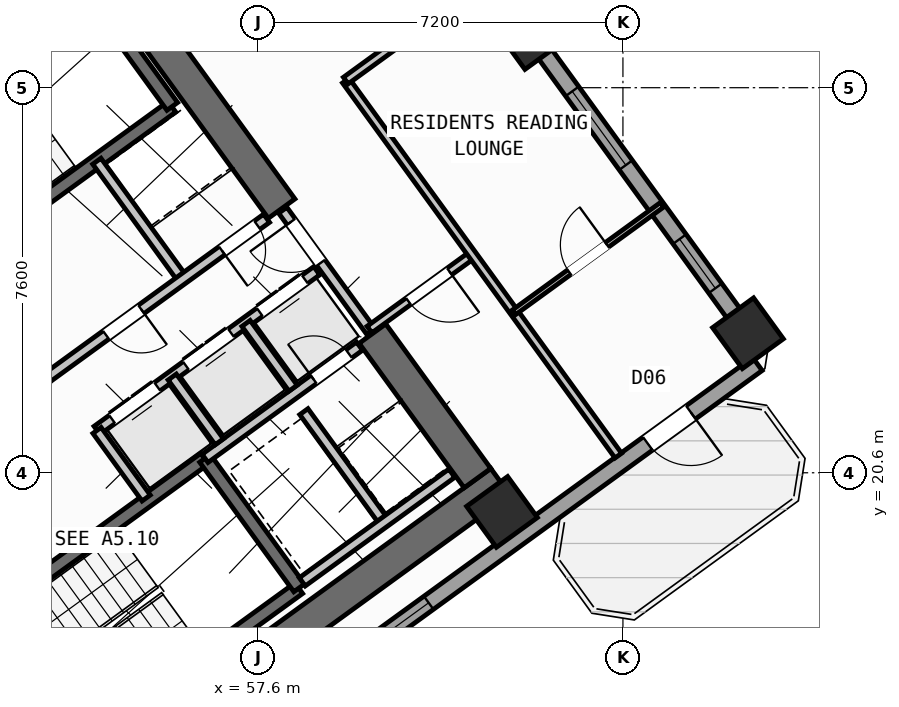
"""IFC4 building model, lengths in metres.
Left out: names, types, materials, properties, quantities, classifications, styles, units other than length and angle.
Written with IfcOpenShell. Run it as: python <this file> out.ifc"""

import sys

from ifc_helpers import new_model, si_unit, direction, frame, frame_2d, origin, origin_2d, place, context, subcontext, project, spatial, rectangle, hollow_rectangle, extrude, source, transform, mapped, element, fill, save


model = new_model("IFC4")
c1 = context("Model", 3, precision=1e-05, world=origin(), true_north=direction((0.0, 1.0)))
c2 = subcontext(c1, "Body", "Model", "MODEL_VIEW")
j1 = project(units=[si_unit("LENGTHUNIT", "METRE"), si_unit("PLANEANGLEUNIT", "RADIAN")], contexts=[c1])
p1 = place(None, origin())
s1 = spatial("IfcSite", under=j1, at=p1, CompositionType="ELEMENT")
p2 = place(p1, origin())
s2 = spatial("IfcBuilding", under=s1, at=p2, CompositionType="ELEMENT")
p3 = place(p2, frame((0.0, 0.0, 71.7)))
s3 = spatial("IfcBuildingStorey", under=s2, at=p3, CompositionType="ELEMENT", Elevation=71.7)
p4 = place(p3, frame((52.318, 13.11, 0.0), z_axis=(0.0, 0.0, 1.0), x_axis=(0.809019445368, 0.587781878776, 0.0)))
e1 = element("IfcWall", 1, at=p4, inside=s3, PredefinedType="SHEAR", context=c2, shape_type="SweptSolid", body=[
    extrude(rectangle(XDim=12.44, YDim=0.65, at=frame_2d((6.22, 0.0))), origin(), (0.0, 0.0, 1.0), 4.52),
])
p5 = place(p3, frame((44.325, 24.113, 0.0), z_axis=(0.0, 0.0, 1.0), x_axis=(0.809012664862, 0.58779121131, 0.0)))
e2 = element("IfcWall", 2, at=p5, inside=s3, PredefinedType="SHEAR", context=c2, shape_type="SweptSolid", body=[
    extrude(rectangle(XDim=12.44, YDim=0.65, at=frame_2d((6.22, 0.0))), origin(), (0.0, 0.0, 1.0), 4.52),
])
p6 = place(p3, frame((61.929, 20.494, 0.0), z_axis=(0.0, 0.0, 1.0), x_axis=(-0.58782982593, 0.808984607855, 0.0)))
e3 = element("IfcWall", 3, at=p6, inside=s3, PredefinedType="SHEAR", context=c2, shape_type="SweptSolid", body=[
    extrude(rectangle(XDim=3.525, YDim=0.65, at=frame_2d((1.762, 0.0))), origin(), (0.0, 0.0, 1.0), 4.52),
])
p7 = place(p3, frame((58.064, 25.813, 0.0), z_axis=(0.0, 0.0, 1.0), x_axis=(-0.58777996584, 0.809020835181, 0.0)))
e4 = element("IfcWall", 4, at=p7, inside=s3, PredefinedType="SHEAR", context=c2, shape_type="SweptSolid", body=[
    extrude(rectangle(XDim=6.375, YDim=0.65, at=frame_2d((3.188, 0.0))), origin(), (0.0, 0.0, 1.0), 4.52),
])
m1 = source(origin(), c2, "Body", "SweptSolid", [
    extrude(hollow_rectangle(XDim=1.0, YDim=1.0, WallThickness=0.04, at=origin_2d()), origin(), (0.0, 0.0, 1.0), 4.8),
])
for number, where, z_axis, x_axis in (
    (5, (62.414, 19.827, 0.0), (0.0, 0.0, 1.0), (0.809, 0.588, 0.0)),
    (6, (67.268, 23.354, 0.0), (0.0, 0.0, 1.0), (0.809, 0.588, 0.0)),
    (7, (62.977, 29.259, 0.0), (0.0, 0.0, 1.0), (0.809, 0.588, 0.0)),
):
    element("IfcColumn", number, at=place(p3, frame(where, z_axis=z_axis, x_axis=x_axis)), inside=s3, PredefinedType="COLUMN", context=c2, shape_type="MappedRepresentation", body=[
        mapped(m1, transform((0.0, 0.0, 0.0), scale=1.0)),
    ])
p8 = place(p3, frame((54.81, 40.5, 0.0), z_axis=(0.0, 0.0, 1.0), x_axis=(0.587783625747, -0.809018176127, 0.0)))
e8 = element("IfcWall", 8, at=p8, inside=s3, PredefinedType="STANDARD", context=c2, shape_type="SweptSolid", body=[
    extrude(rectangle(XDim=21.587, YDim=0.32, at=frame_2d((10.794, 0.0))), origin(), (0.0, 0.0, 1.0), 3.895),
])
p9 = place(p8, frame((7.729, 0.0, 0.85)))
e9 = element("IfcOpeningElement", 9, at=p9, cuts=e8, PredefinedType="OPENING", context=c2, shape_type="SweptSolid", body=[
    extrude(rectangle(XDim=1.8, YDim=1.5, at=frame_2d((0.9, 0.75))), frame((0.0, 0.17, 0.0), z_axis=(0.0, -1.0, 0.0), x_axis=(1.0, 0.0, 0.0)), (0.0, 0.0, 1.0), 0.34),
])
p10 = place(p8, frame((15.292, 0.0, 0.85)))
e10 = element("IfcOpeningElement", 10, at=p10, cuts=e8, PredefinedType="OPENING", context=c2, shape_type="SweptSolid", body=[
    extrude(rectangle(XDim=1.8, YDim=1.5, at=frame_2d((0.9, 0.75))), frame((0.0, 0.17, 0.0), z_axis=(0.0, -1.0, 0.0), x_axis=(1.0, 0.0, 0.0)), (0.0, 0.0, 1.0), 0.34),
])
p11 = place(p8, frame((18.897, 0.0, 0.95)))
e11 = element("IfcOpeningElement", 11, at=p11, cuts=e8, PredefinedType="OPENING", context=c2, shape_type="SweptSolid", body=[
    extrude(rectangle(XDim=1.2, YDim=1.4, at=frame_2d((0.6, 0.7))), frame((0.0, 0.17, 0.0), z_axis=(0.0, -1.0, 0.0), x_axis=(1.0, 0.0, 0.0)), (0.0, 0.0, 1.0), 0.34),
])
p12 = place(p3, frame((67.454, 22.747, 0.0), z_axis=(0.0, 0.0, 1.0), x_axis=(-0.809021120468, -0.587779573171, 0.0)))
e12 = element("IfcWall", 12, at=p12, inside=s3, PredefinedType="STANDARD", context=c2, shape_type="SweptSolid", body=[
    extrude(rectangle(XDim=17.588, YDim=0.32, at=frame_2d((8.794, 0.0))), origin(), (0.0, 0.0, 1.0), 4.52),
])
p13 = place(p12, frame((1.624, 0.0, 0.0)))
e13 = element("IfcOpeningElement", 13, at=p13, cuts=e12, PredefinedType="OPENING", context=c2, shape_type="SweptSolid", body=[
    extrude(rectangle(XDim=1.05, YDim=2.15, at=frame_2d((0.525, 1.075))), frame((0.0, 0.17, 0.0), z_axis=(0.0, -1.0, 0.0), x_axis=(1.0, 0.0, 0.0)), (0.0, 0.0, 1.0), 0.34),
])
p14 = place(p12, frame((8.019, 0.0, 0.75)))
e14 = element("IfcOpeningElement", 14, at=p14, cuts=e12, PredefinedType="OPENING", context=c2, shape_type="SweptSolid", body=[
    extrude(rectangle(XDim=2.4, YDim=1.6, at=frame_2d((1.2, 0.8))), frame((0.0, 0.17, 0.0), z_axis=(0.0, -1.0, 0.0), x_axis=(1.0, 0.0, 0.0)), (0.0, 0.0, 1.0), 0.34),
])
p15 = place(p12, frame((13.169, 0.0, 0.75)))
e15 = element("IfcOpeningElement", 15, at=p15, cuts=e12, PredefinedType="OPENING", context=c2, shape_type="SweptSolid", body=[
    extrude(rectangle(XDim=2.4, YDim=1.6, at=frame_2d((1.2, 0.8))), frame((0.0, 0.17, 0.0), z_axis=(0.0, -1.0, 0.0), x_axis=(1.0, 0.0, 0.0)), (0.0, 0.0, 1.0), 0.34),
])
p16 = place(p3, frame((48.006, 25.996, 0.0), z_axis=(0.0, 0.0, 1.0), x_axis=(0.80901903764, 0.587782439969, 0.0)))
e16 = element("IfcWall", 16, at=p16, inside=s3, PredefinedType="SHEAR", context=c2, shape_type="SweptSolid", body=[
    extrude(rectangle(XDim=7.46, YDim=0.26, at=frame_2d((3.73, 0.0))), origin(), (0.0, 0.0, 1.0), 4.52),
])
p17 = place(p3, frame((49.863, 23.44, 0.0), z_axis=(0.0, 0.0, 1.0), x_axis=(0.809003474932, 0.587803859759, 0.0)))
e17 = element("IfcWall", 17, at=p17, inside=s3, PredefinedType="SHEAR", context=c2, shape_type="SweptSolid", body=[
    extrude(rectangle(XDim=7.46, YDim=0.26, at=frame_2d((3.73, 0.0))), origin(), (0.0, 0.0, 1.0), 4.52),
])
p18 = place(p17, frame((0.36, 0.0, 0.0)))
e18 = element("IfcOpeningElement", 18, at=p18, cuts=e17, PredefinedType="OPENING", context=c2, shape_type="SweptSolid", body=[
    extrude(rectangle(XDim=0.86, YDim=2.05, at=frame_2d((0.43, 1.025))), frame((0.0, 0.14, 0.0), z_axis=(0.0, -1.0, 0.0), x_axis=(1.0, 0.0, 0.0)), (0.0, 0.0, 1.0), 0.28),
])
p19 = place(p3, frame((55.906, 27.831, 0.0), z_axis=(0.0, 0.0, 1.0), x_axis=(-0.587804123638, 0.809003283204, 0.0)))
e19 = element("IfcWall", 19, at=p19, inside=s3, PredefinedType="SHEAR", context=c2, shape_type="SweptSolid", body=[
    extrude(rectangle(XDim=3.16, YDim=0.26, at=frame_2d((1.58, 0.0))), origin(), (0.0, 0.0, 1.0), 4.52),
])
p20 = place(p3, frame((52.472, 14.013, 0.0), z_axis=(0.0, 0.0, 1.0), x_axis=(0.809028366311, 0.587769599847, 0.0)))
e20 = element("IfcWall", 20, at=p20, inside=s3, PredefinedType="SHEAR", context=c2, shape_type="SweptSolid", body=[
    extrude(rectangle(XDim=7.33, YDim=0.26, at=frame_2d((3.665, 0.0))), origin(), (0.0, 0.0, 1.0), 4.52),
])
p21 = place(p3, frame((50.615, 16.57, 0.0), z_axis=(0.0, 0.0, 1.0), x_axis=(0.809028366311, 0.587769599847, 0.0)))
e21 = element("IfcWall", 21, at=p21, inside=s3, PredefinedType="SHEAR", context=c2, shape_type="SweptSolid", body=[
    extrude(rectangle(XDim=7.33, YDim=0.26, at=frame_2d((3.665, 0.0))), origin(), (0.0, 0.0, 1.0), 4.52),
])
p22 = place(p21, frame((0.22, 0.0, 0.0)))
e22 = element("IfcOpeningElement", 22, at=p22, cuts=e21, PredefinedType="OPENING", context=c2, shape_type="SweptSolid", body=[
    extrude(rectangle(XDim=1.1, YDim=2.1, at=frame_2d((0.55, 1.05))), frame((0.0, 0.14, 0.0), z_axis=(0.0, -1.0, 0.0), x_axis=(1.0, 0.0, 0.0)), (0.0, 0.0, 1.0), 0.28),
])
p23 = place(p3, frame((58.41, 18.327, 0.0), z_axis=(0.0, 0.0, 1.0), x_axis=(-0.58776738483, 0.809029975545, 0.0)))
e23 = element("IfcWall", 23, at=p23, inside=s3, PredefinedType="SHEAR", context=c2, shape_type="SweptSolid", body=[
    extrude(rectangle(XDim=3.16, YDim=0.26, at=frame_2d((1.58, 0.0))), origin(), (0.0, 0.0, 1.0), 4.52),
])
p24 = place(p3, frame((56.553, 20.884, 0.0), z_axis=(0.0, 0.0, 1.0), x_axis=(0.809035789462, 0.587759382205, 0.0)))
e24 = element("IfcWall", 24, at=p24, inside=s3, PredefinedType="STANDARD", context=c2, shape_type="SweptSolid", body=[
    extrude(rectangle(XDim=3.768, YDim=0.2, at=frame_2d((1.884, 0.0))), origin(), (0.0, 0.0, 1.0), 4.51),
])
p25 = place(p24, frame((2.65, 0.0, 0.0)))
e25 = element("IfcOpeningElement", 25, at=p25, cuts=e24, PredefinedType="OPENING", context=c2, shape_type="SweptSolid", body=[
    extrude(rectangle(XDim=0.86, YDim=2.05, at=frame_2d((0.43, 1.025))), frame((0.0, 0.11, 0.0), z_axis=(0.0, -1.0, 0.0), x_axis=(1.0, 0.0, 0.0)), (0.0, 0.0, 1.0), 0.22),
])
p26 = place(p3, frame((54.421, 21.436, 0.0), z_axis=(0.0, 0.0, 1.0), x_axis=(0.809013710463, 0.587789772183, 0.0)))
e26 = element("IfcWall", 26, at=p26, inside=s3, PredefinedType="STANDARD", context=c2, shape_type="SweptSolid", body=[
    extrude(rectangle(XDim=5.36, YDim=0.2, at=frame_2d((2.68, 0.0))), origin(), (0.0, 0.0, 1.0), 4.51),
])
p27 = place(p26, frame((0.37, 0.0, 0.0)))
e27 = element("IfcOpeningElement", 27, at=p27, cuts=e26, PredefinedType="OPENING", context=c2, shape_type="SweptSolid", body=[
    extrude(rectangle(XDim=1.1, YDim=2.15, at=frame_2d((0.55, 1.075))), frame((0.0, 0.11, 0.0), z_axis=(0.0, -1.0, 0.0), x_axis=(1.0, 0.0, 0.0)), (0.0, 0.0, 1.0), 0.22),
])
p28 = place(p26, frame((2.17, 0.0, 0.0)))
e28 = element("IfcOpeningElement", 28, at=p28, cuts=e26, PredefinedType="OPENING", context=c2, shape_type="SweptSolid", body=[
    extrude(rectangle(XDim=1.1, YDim=2.15, at=frame_2d((0.55, 1.075))), frame((0.0, 0.11, 0.0), z_axis=(0.0, -1.0, 0.0), x_axis=(1.0, 0.0, 0.0)), (0.0, 0.0, 1.0), 0.22),
])
p29 = place(p26, frame((3.97, 0.0, 0.0)))
e29 = element("IfcOpeningElement", 29, at=p29, cuts=e26, PredefinedType="OPENING", context=c2, shape_type="SweptSolid", body=[
    extrude(rectangle(XDim=1.1, YDim=2.15, at=frame_2d((0.55, 1.075))), frame((0.0, 0.11, 0.0), z_axis=(0.0, -1.0, 0.0), x_axis=(1.0, 0.0, 0.0)), (0.0, 0.0, 1.0), 0.22),
])
p30 = place(p3, frame((55.391, 20.102, 0.0), z_axis=(0.0, 0.0, 1.0), x_axis=(-0.58778447739, 0.809017557374, 0.0)))
e30 = element("IfcWall", 30, at=p30, inside=s3, PredefinedType="STANDARD", context=c2, shape_type="SweptSolid", body=[
    extrude(rectangle(XDim=1.65, YDim=0.2, at=frame_2d((0.825, 0.0))), origin(), (0.0, 0.0, 1.0), 4.51),
])
p31 = place(p3, frame((56.834, 21.212, 0.0), z_axis=(0.0, 0.0, 1.0), x_axis=(-0.58776738483, 0.809029975545, 0.0)))
e31 = element("IfcWall", 31, at=p31, inside=s3, PredefinedType="STANDARD", context=c2, shape_type="SweptSolid", body=[
    extrude(rectangle(XDim=1.58, YDim=0.2, at=frame_2d((0.79, 0.0))), origin(), (0.0, 0.0, 1.0), 4.51),
])
p32 = place(p3, frame((58.29, 22.27, 0.0), z_axis=(0.0, 0.0, 1.0), x_axis=(-0.587840865826, 0.808976585857, 0.0)))
e32 = element("IfcWall", 32, at=p32, inside=s3, PredefinedType="STANDARD", context=c2, shape_type="SweptSolid", body=[
    extrude(rectangle(XDim=1.58, YDim=0.2, at=frame_2d((0.79, 0.0))), origin(), (0.0, 0.0, 1.0), 4.51),
])
p33 = place(p3, frame((60.067, 19.655, 0.0), z_axis=(0.0, 0.0, 1.0), x_axis=(-0.587800520745, 0.809005900975, 0.0)))
e33 = element("IfcWall", 33, at=p33, inside=s3, PredefinedType="STANDARD", context=c2, shape_type="SweptSolid", body=[
    extrude(rectangle(XDim=2.66, YDim=0.2, at=frame_2d((1.33, 0.0))), origin(), (0.0, 0.0, 1.0), 4.51),
])
p34 = place(p3, frame((58.472, 18.447, 0.0), z_axis=(0.0, 0.0, 1.0), x_axis=(0.809022487728, 0.587777691266, 0.0)))
e34 = element("IfcWall", 34, at=p34, inside=s3, PredefinedType="STANDARD", context=c2, shape_type="SweptSolid", body=[
    extrude(rectangle(XDim=3.648, YDim=0.2, at=frame_2d((1.824, 0.0))), origin(), (0.0, 0.0, 1.0), 4.51),
])
p35 = place(p3, frame((56.111, 24.419, 0.0), z_axis=(0.0, 0.0, 1.0), x_axis=(-0.58777848983, 0.809021907548, 0.0)))
e35 = element("IfcWall", 35, at=p35, inside=s3, PredefinedType="STANDARD", context=c2, shape_type="SweptSolid", body=[
    extrude(rectangle(XDim=2.88, YDim=0.2, at=frame_2d((1.44, 0.0))), origin(), (0.0, 0.0, 1.0), 4.51),
])
p36 = place(p3, frame((53.425, 22.468, 0.0), z_axis=(0.0, 0.0, 1.0), x_axis=(0.80902705128, 0.587771409902, 0.0)))
e36 = element("IfcWall", 36, at=p36, inside=s3, PredefinedType="STANDARD", context=c2, shape_type="SweptSolid", body=[
    extrude(rectangle(XDim=5.368, YDim=0.2, at=frame_2d((2.684, 0.0))), origin(), (0.0, 0.0, 1.0), 4.51),
])
p37 = place(p36, frame((4.28, 0.0, 0.0)))
e37 = element("IfcOpeningElement", 37, at=p37, cuts=e36, PredefinedType="OPENING", context=c2, shape_type="SweptSolid", body=[
    extrude(rectangle(XDim=0.86, YDim=2.05, at=frame_2d((0.43, 1.025))), frame((0.0, 0.11, 0.0), z_axis=(0.0, -1.0, 0.0), x_axis=(1.0, 0.0, 0.0)), (0.0, 0.0, 1.0), 0.22),
])
p38 = place(p36, frame((1.45, 0.0, 0.0)))
e38 = element("IfcOpeningElement", 38, at=p38, cuts=e36, PredefinedType="OPENING", context=c2, shape_type="SweptSolid", body=[
    extrude(rectangle(XDim=0.86, YDim=2.05, at=frame_2d((0.43, 1.025))), frame((0.0, 0.11, 0.0), z_axis=(0.0, -1.0, 0.0), x_axis=(1.0, 0.0, 0.0)), (0.0, 0.0, 1.0), 0.22),
])
p39 = place(p3, frame((59.827, 23.386, 0.0), z_axis=(0.0, 0.0, 1.0), x_axis=(-0.587803840107, 0.809003489211, 0.0)))
e39 = element("IfcWall", 39, at=p39, inside=s3, PredefinedType="STANDARD", context=c2, shape_type="SweptSolid", body=[
    extrude(rectangle(XDim=2.96, YDim=0.2, at=frame_2d((1.48, 0.0))), origin(), (0.0, 0.0, 1.0), 4.51),
])
p40 = place(p39, frame((1.68, 0.0, 0.0)))
e40 = element("IfcOpeningElement", 40, at=p40, cuts=e39, PredefinedType="OPENING", context=c2, shape_type="SweptSolid", body=[
    extrude(rectangle(XDim=1.0, YDim=2.1, at=frame_2d((0.5, 1.05))), frame((0.0, 0.11, 0.0), z_axis=(0.0, -1.0, 0.0), x_axis=(1.0, 0.0, 0.0)), (0.0, 0.0, 1.0), 0.22),
])
p41 = place(p3, frame((59.798, 23.427, 0.0), z_axis=(0.0, 0.0, 1.0), x_axis=(0.809034604122, 0.587761013791, 0.0)))
e41 = element("IfcWall", 41, at=p41, inside=s3, PredefinedType="PARTITIONING", context=c2, shape_type="SweptSolid", body=[
    extrude(rectangle(XDim=2.51, YDim=0.16, at=frame_2d((1.255, 0.0))), origin(), (0.0, 0.0, 1.0), 4.51),
])
p42 = place(p41, frame((0.95, 0.0, 0.0)))
e42 = element("IfcOpeningElement", 42, at=p42, cuts=e41, PredefinedType="OPENING", context=c2, shape_type="SweptSolid", body=[
    extrude(rectangle(XDim=1.0, YDim=2.1, at=frame_2d((0.5, 1.05))), frame((0.0, 0.09, 0.0), z_axis=(0.0, -1.0, 0.0), x_axis=(1.0, 0.0, 0.0)), (0.0, 0.0, 1.0), 0.18),
])
p43 = place(p3, frame((64.709, 20.938, 0.0), z_axis=(0.0, 0.0, 1.0), x_axis=(-0.587776590479, 0.80902328748, 0.0)))
e43 = element("IfcWall", 43, at=p43, inside=s3, PredefinedType="PARTITIONING", context=c2, shape_type="SweptSolid", body=[
    extrude(rectangle(XDim=9.15, YDim=0.16, at=frame_2d((4.575, 0.0))), origin(), (0.0, 0.0, 1.0), 4.51),
])
p44 = place(p3, frame((59.331, 28.341, 0.0), z_axis=(0.0, 0.0, 1.0), x_axis=(0.809003564202, 0.587803736896, 0.0)))
e44 = element("IfcWall", 44, at=p44, inside=s3, PredefinedType="PARTITIONING", context=c2, shape_type="SweptSolid", body=[
    extrude(rectangle(XDim=3.63, YDim=0.16, at=frame_2d((1.815, 0.0))), origin(), (0.0, 0.0, 1.0), 4.51),
])
p45 = place(p44, frame((1.305, 0.0, 0.0)))
e45 = element("IfcOpeningElement", 45, at=p45, cuts=e44, PredefinedType="OPENING", context=c2, shape_type="SweptSolid", body=[
    extrude(rectangle(XDim=1.0, YDim=2.1, at=frame_2d((0.5, 1.05))), frame((0.0, 0.09, 0.0), z_axis=(0.0, -1.0, 0.0), x_axis=(1.0, 0.0, 0.0)), (0.0, 0.0, 1.0), 0.18),
])
p46 = place(p3, frame((62.653, 23.768, 0.0), z_axis=(0.0, 0.0, 1.0), x_axis=(0.809037198293, 0.58775744298, 0.0)))
e46 = element("IfcWall", 46, at=p46, inside=s3, PredefinedType="PARTITIONING", context=c2, shape_type="SweptSolid", body=[
    extrude(rectangle(XDim=3.61, YDim=0.11, at=frame_2d((1.805, 0.0))), origin(), (0.0, 0.0, 1.0), 4.51),
])
p47 = place(p46, frame((1.345, 0.0, 0.0)))
e47 = element("IfcOpeningElement", 47, at=p47, cuts=e46, PredefinedType="OPENING", context=c2, shape_type="SweptSolid", body=[
    extrude(rectangle(XDim=0.92, YDim=2.08, at=frame_2d((0.46, 1.04))), frame((0.0, 0.065, 0.0), z_axis=(0.0, -1.0, 0.0), x_axis=(1.0, 0.0, 0.0)), (0.0, 0.0, 1.0), 0.13),
])
p48 = place(p3, frame((42.866, 26.044, 0.0), z_axis=(0.0, 0.0, 1.0), x_axis=(0.809020254154, 0.587780765566, 0.0)))
e48 = element("IfcWall", 48, at=p48, inside=s3, PredefinedType="PARTITIONING", context=c2, shape_type="SweptSolid", body=[
    extrude(rectangle(XDim=14.67, YDim=0.16, at=frame_2d((7.335, 0.0))), origin(), (0.0, 0.0, 1.0), 4.51),
])
p49 = place(p48, frame((3.335, 0.0, 0.0)))
e49 = element("IfcOpeningElement", 49, at=p49, cuts=e48, PredefinedType="OPENING", context=c2, shape_type="SweptSolid", body=[
    extrude(rectangle(XDim=1.0, YDim=2.1, at=frame_2d((0.5, 1.05))), frame((0.0, 0.09, 0.0), z_axis=(0.0, -1.0, 0.0), x_axis=(1.0, 0.0, 0.0)), (0.0, 0.0, 1.0), 0.18),
])
p50 = place(p48, frame((9.915, 0.0, 0.0)))
e50 = element("IfcOpeningElement", 50, at=p50, cuts=e48, PredefinedType="OPENING", context=c2, shape_type="SweptSolid", body=[
    extrude(rectangle(XDim=1.0, YDim=2.1, at=frame_2d((0.5, 1.05))), frame((0.0, 0.09, 0.0), z_axis=(0.0, -1.0, 0.0), x_axis=(1.0, 0.0, 0.0)), (0.0, 0.0, 1.0), 0.18),
])
m2 = source(origin(), c2, "Body", "SweptSolid", [
    extrude(rectangle(XDim=1.05, YDim=2.15, at=frame_2d((0.525, 1.075))), frame((0.0, 0.025, 0.0), z_axis=(0.0, -1.0, 0.0), x_axis=(1.0, 0.0, 0.0)), (0.0, 0.0, 1.0), 0.05),
])
p51 = place(p13, origin())
e51 = element("IfcDoor", 51, at=p51, inside=s3, OperationType="SINGLE_SWING_LEFT", PredefinedType="DOOR", context=c2, shape_type="MappedRepresentation", body=[
    mapped(m2, transform((0.0, 0.0, 0.0), scale=1.0)),
])
fill(e13, e51)
m3 = source(origin(), c2, "Body", "SweptSolid", [
    extrude(rectangle(XDim=1.8, YDim=1.5, at=frame_2d((0.9, 0.75))), frame((0.0, 0.03, 0.0), z_axis=(0.0, -1.0, 0.0), x_axis=(1.0, 0.0, 0.0)), (0.0, 0.0, 1.0), 0.06),
])
p52 = place(p10, origin())
e52 = element("IfcWindow", 52, at=p52, inside=s3, PartitioningType="SINGLE_PANEL", PredefinedType="WINDOW", context=c2, shape_type="MappedRepresentation", body=[
    mapped(m3, transform((0.0, 0.0, 0.0), scale=1.0)),
])
fill(e10, e52)
m4 = source(origin(), c2, "Body", "SweptSolid", [
    extrude(rectangle(XDim=1.2, YDim=1.4, at=frame_2d((0.6, 0.7))), frame((0.0, 0.03, 0.0), z_axis=(0.0, -1.0, 0.0), x_axis=(1.0, 0.0, 0.0)), (0.0, 0.0, 1.0), 0.06),
])
p53 = place(p11, origin())
e53 = element("IfcWindow", 53, at=p53, inside=s3, PartitioningType="SINGLE_PANEL", PredefinedType="WINDOW", context=c2, shape_type="MappedRepresentation", body=[
    mapped(m4, transform((0.0, 0.0, 0.0), scale=1.0)),
])
fill(e11, e53)
m5 = source(origin(), c2, "Body", "SweptSolid", [
    extrude(rectangle(XDim=2.4, YDim=1.6, at=frame_2d((1.2, 0.8))), frame((0.0, 0.03, 0.0), z_axis=(0.0, -1.0, 0.0), x_axis=(1.0, 0.0, 0.0)), (0.0, 0.0, 1.0), 0.06),
])
p54 = place(p14, origin())
e54 = element("IfcWindow", 54, at=p54, inside=s3, PartitioningType="SINGLE_PANEL", PredefinedType="WINDOW", context=c2, shape_type="MappedRepresentation", body=[
    mapped(m5, transform((0.0, 0.0, 0.0), scale=1.0)),
])
fill(e14, e54)
m6 = source(origin(), c2, "Body", "SweptSolid", [
    extrude(rectangle(XDim=1.1, YDim=2.15, at=frame_2d((0.55, 1.075))), frame((0.0, 0.025, 0.0), z_axis=(0.0, -1.0, 0.0), x_axis=(1.0, 0.0, 0.0)), (0.0, 0.0, 1.0), 0.05),
])
p55 = place(p27, origin())
e55 = element("IfcDoor", 55, at=p55, inside=s3, OperationType="DOUBLE_DOOR_SLIDING", PredefinedType="DOOR", context=c2, shape_type="MappedRepresentation", body=[
    mapped(m6, transform((0.0, 0.0, 0.0), scale=1.0)),
])
fill(e27, e55)
p56 = place(p28, origin())
e56 = element("IfcDoor", 56, at=p56, inside=s3, OperationType="DOUBLE_DOOR_SLIDING", PredefinedType="DOOR", context=c2, shape_type="MappedRepresentation", body=[
    mapped(m6, transform((0.0, 0.0, 0.0), scale=1.0)),
])
fill(e28, e56)
p57 = place(p29, origin())
e57 = element("IfcDoor", 57, at=p57, inside=s3, OperationType="DOUBLE_DOOR_SLIDING", PredefinedType="DOOR", context=c2, shape_type="MappedRepresentation", body=[
    mapped(m6, transform((0.0, 0.0, 0.0), scale=1.0)),
])
fill(e29, e57)
m7 = source(origin(), c2, "Body", "SweptSolid", [
    extrude(rectangle(XDim=0.86, YDim=2.05, at=frame_2d((0.43, 1.025))), frame((0.0, 0.025, 0.0), z_axis=(0.0, -1.0, 0.0), x_axis=(1.0, 0.0, 0.0)), (0.0, 0.0, 1.0), 0.05),
])
p58 = place(p25, origin())
e58 = element("IfcDoor", 58, at=p58, inside=s3, OperationType="SINGLE_SWING_LEFT", PredefinedType="DOOR", context=c2, shape_type="MappedRepresentation", body=[
    mapped(m7, transform((0.0, 0.0, 0.0), scale=1.0)),
])
fill(e25, e58)
p59 = place(p37, frame((0.86, 0.0, 0.0), z_axis=(0.0, 0.0, 1.0), x_axis=(-1.0, 0.0, 0.0)))
e59 = element("IfcDoor", 59, at=p59, inside=s3, OperationType="SINGLE_SWING_RIGHT", PredefinedType="DOOR", context=c2, shape_type="MappedRepresentation", body=[
    mapped(m7, transform((0.0, 0.0, 0.0), scale=1.0)),
])
fill(e37, e59)
p60 = place(p38, frame((0.86, 0.0, 0.0), z_axis=(0.0, 0.0, 1.0), x_axis=(-1.0, 0.0, 0.0)))
e60 = element("IfcDoor", 60, at=p60, inside=s3, OperationType="SINGLE_SWING_LEFT", PredefinedType="DOOR", context=c2, shape_type="MappedRepresentation", body=[
    mapped(m7, transform((0.0, 0.0, 0.0), scale=1.0)),
])
fill(e38, e60)
m8 = source(origin(), c2, "Body", "SweptSolid", [
    extrude(rectangle(XDim=1.0, YDim=2.1, at=frame_2d((0.5, 1.05))), frame((0.0, 0.025, 0.0), z_axis=(0.0, -1.0, 0.0), x_axis=(1.0, 0.0, 0.0)), (0.0, 0.0, 1.0), 0.05),
])
p61 = place(p42, frame((1.0, 0.0, 0.0), z_axis=(0.0, 0.0, 1.0), x_axis=(-1.0, 0.0, 0.0)))
e61 = element("IfcDoor", 61, at=p61, inside=s3, OperationType="SINGLE_SWING_LEFT", PredefinedType="DOOR", context=c2, shape_type="MappedRepresentation", body=[
    mapped(m8, transform((0.0, 0.0, 0.0), scale=1.0)),
])
fill(e42, e61)
p62 = place(p40, origin())
e62 = element("IfcDoor", 62, at=p62, inside=s3, OperationType="SINGLE_SWING_RIGHT", PredefinedType="DOOR", context=c2, shape_type="MappedRepresentation", body=[
    mapped(m8, transform((0.0, 0.0, 0.0), scale=1.0)),
])
fill(e40, e62)
m9 = source(origin(), c2, "Body", "SweptSolid", [
    extrude(rectangle(XDim=0.92, YDim=2.08, at=frame_2d((0.46, 1.04))), frame((0.0, 0.025, 0.0), z_axis=(0.0, -1.0, 0.0), x_axis=(1.0, 0.0, 0.0)), (0.0, 0.0, 1.0), 0.05),
])
p63 = place(p47, origin())
e63 = element("IfcDoor", 63, at=p63, inside=s3, OperationType="SINGLE_SWING_RIGHT", PredefinedType="DOOR", context=c2, shape_type="MappedRepresentation", body=[
    mapped(m9, transform((0.0, 0.0, 0.0), scale=1.0)),
])
fill(e47, e63)
save(model, sys.argv[1])
